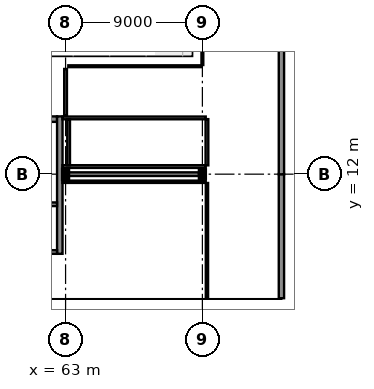
"""IFC4 building model, lengths in metres.
Left out: names, types, materials, properties, quantities, classifications, styles, units other than length and angle.
Written with IfcOpenShell. Run it as: python <this file> out.ifc"""

import sys

from ifc_helpers import new_model, si_unit, direction, frame, frame_2d, origin, origin_2d, place, context, subcontext, project, spatial, rectangle, i_section, extrude, element, fill, save


model = new_model("IFC4")
c1 = context("Model", 3, precision=1e-05, world=origin(), true_north=direction((0.0, 1.0)))
c2 = subcontext(c1, "Body", "Model", "MODEL_VIEW")
j1 = project(units=[si_unit("LENGTHUNIT", "METRE"), si_unit("PLANEANGLEUNIT", "RADIAN")], contexts=[c1])
p1 = place(None, origin())
s1 = spatial("IfcSite", under=j1, at=p1, CompositionType="ELEMENT")
p2 = place(p1, origin())
s2 = spatial("IfcBuilding", under=s1, at=p2, CompositionType="ELEMENT")
p3 = place(p2, origin())
s3 = spatial("IfcBuildingStorey", under=s2, at=p3, CompositionType="ELEMENT", Elevation=0.0)
p4 = place(p3, frame((63.0, 12.0, 0.0), z_axis=(0.0, 0.0, 1.0), x_axis=(1.0, 0.0, 0.0)))
e1 = element("IfcColumn", 1, at=p4, inside=s3, PredefinedType="COLUMN", context=c2, shape_type="SweptSolid", body=[
    extrude(i_section(OverallWidth=0.3, OverallDepth=0.55, WebThickness=0.015, FlangeThickness=0.029, at=origin_2d()), origin(), (0.0, 0.0, 1.0), 5.4),
])
p5 = place(p3, frame((72.0, 12.0, 0.0), z_axis=(0.0, 0.0, 1.0), x_axis=(0.0, 1.0, 0.0)))
e2 = element("IfcColumn", 2, at=p5, inside=s3, PredefinedType="COLUMN", context=c2, shape_type="SweptSolid", body=[
    extrude(i_section(OverallWidth=0.3, OverallDepth=0.45, WebThickness=0.014, FlangeThickness=0.026, at=origin_2d()), origin(), (0.0, 0.0, 1.0), 5.4),
])
p6 = place(p3, frame((77.2, 3.84, 0.0), z_axis=(0.0, 0.0, 1.0), x_axis=(0.0, 1.0, 0.0)))
e3 = element("IfcWall", 3, at=p6, inside=s3, PredefinedType="SOLIDWALL", context=c2, shape_type="SweptSolid", body=[
    extrude(rectangle(XDim=8.17, YDim=0.35, at=frame_2d((4.085, 0.0))), origin(), (0.0, 0.0, 1.0), 5.08),
])
p7 = place(p6, frame((1.701, 0.0, 0.85)))
e4 = element("IfcOpeningElement", 4, at=p7, cuts=e3, PredefinedType="OPENING", context=c2, shape_type="SweptSolid", body=[
    extrude(rectangle(XDim=1.5, YDim=1.5, at=frame_2d((0.75, 0.75))), frame((0.0, 0.19, 0.0), z_axis=(0.0, -1.0, 0.0), x_axis=(1.0, 0.0, 0.0)), (0.0, 0.0, 1.0), 0.38),
])
p8 = place(p6, frame((4.969, 0.0, 0.85)))
e5 = element("IfcOpeningElement", 5, at=p8, cuts=e3, PredefinedType="OPENING", context=c2, shape_type="SweptSolid", body=[
    extrude(rectangle(XDim=1.5, YDim=1.5, at=frame_2d((0.75, 0.75))), frame((0.0, 0.19, 0.0), z_axis=(0.0, -1.0, 0.0), x_axis=(1.0, 0.0, 0.0)), (0.0, 0.0, 1.0), 0.38),
])
p9 = place(p3, frame((77.2, 11.99, 0.0), z_axis=(0.0, 0.0, 1.0), x_axis=(0.0, 1.0, 0.0)))
e6 = element("IfcWall", 6, at=p9, inside=s3, PredefinedType="SOLIDWALL", context=c2, shape_type="SweptSolid", body=[
    extrude(rectangle(XDim=12.05, YDim=0.35, at=frame_2d((6.025, 0.0))), origin(), (0.0, 0.0, 1.0), 5.08),
])
p10 = place(p9, frame((2.07, 0.0, 0.85)))
e7 = element("IfcOpeningElement", 7, at=p10, cuts=e6, PredefinedType="OPENING", context=c2, shape_type="SweptSolid", body=[
    extrude(rectangle(XDim=1.4, YDim=1.4, at=frame_2d((0.7, 0.7))), frame((0.0, 0.19, 0.0), z_axis=(0.0, -1.0, 0.0), x_axis=(1.0, 0.0, 0.0)), (0.0, 0.0, 1.0), 0.38),
])
p11 = place(p9, frame((7.735, 0.0, 0.85)))
e8 = element("IfcOpeningElement", 8, at=p11, cuts=e6, PredefinedType="OPENING", context=c2, shape_type="SweptSolid", body=[
    extrude(rectangle(XDim=1.4, YDim=1.4, at=frame_2d((0.7, 0.7))), frame((0.0, 0.19, 0.0), z_axis=(0.0, -1.0, 0.0), x_axis=(1.0, 0.0, 0.0)), (0.0, 0.0, 1.0), 0.38),
])
p12 = place(p3, frame((58.54, 15.62, 0.0), z_axis=(0.0, 0.0, 1.0), x_axis=(1.0, 0.0, 0.0)))
e9 = element("IfcWall", 9, at=p12, inside=s3, PredefinedType="SHEAR", context=c2, shape_type="SweptSolid", body=[
    extrude(rectangle(XDim=3.9, YDim=0.36, at=frame_2d((1.95, 0.0))), origin(), (0.0, 0.0, 1.0), 5.06),
])
p13 = place(p12, frame((1.15, 0.0, 0.0)))
e10 = element("IfcOpeningElement", 10, at=p13, cuts=e9, PredefinedType="OPENING", context=c2, shape_type="SweptSolid", body=[
    extrude(rectangle(XDim=1.6, YDim=2.25, at=frame_2d((0.8, 1.125))), frame((0.0, 0.195, 0.0), z_axis=(0.0, -1.0, 0.0), x_axis=(1.0, 0.0, 0.0)), (0.0, 0.0, 1.0), 0.39),
])
p14 = place(p3, frame((62.62, 6.76, 0.0), z_axis=(0.0, 0.0, 1.0), x_axis=(0.0, 1.0, 0.0)))
e11 = element("IfcWall", 11, at=p14, inside=s3, PredefinedType="SHEAR", context=c2, shape_type="SweptSolid", body=[
    extrude(rectangle(XDim=9.04, YDim=0.36, at=frame_2d((4.52, 0.0))), origin(), (0.0, 0.0, 1.0), 5.06),
])
p15 = place(p3, frame((58.54, 10.02, 0.0), z_axis=(0.0, 0.0, 1.0), x_axis=(1.0, 0.0, 0.0)))
e12 = element("IfcWall", 12, at=p15, inside=s3, PredefinedType="SHEAR", context=c2, shape_type="SweptSolid", body=[
    extrude(rectangle(XDim=3.9, YDim=0.24, at=frame_2d((1.95, 0.0))), origin(), (0.0, 0.0, 1.0), 5.21),
])
p16 = place(p15, frame((0.235, 0.0, 0.0)))
e13 = element("IfcOpeningElement", 13, at=p16, cuts=e12, PredefinedType="OPENING", context=c2, shape_type="SweptSolid", body=[
    extrude(rectangle(XDim=1.6, YDim=2.3, at=frame_2d((0.8, 1.15))), frame((0.0, 0.135, 0.0), z_axis=(0.0, -1.0, 0.0), x_axis=(1.0, 0.0, 0.0)), (0.0, 0.0, 1.0), 0.27),
])
p17 = place(p15, frame((2.185, 0.0, 0.0)))
e14 = element("IfcOpeningElement", 14, at=p17, cuts=e12, PredefinedType="OPENING", context=c2, shape_type="SweptSolid", body=[
    extrude(rectangle(XDim=1.6, YDim=2.3, at=frame_2d((0.8, 1.15))), frame((0.0, 0.135, 0.0), z_axis=(0.0, -1.0, 0.0), x_axis=(1.0, 0.0, 0.0)), (0.0, 0.0, 1.0), 0.27),
])
p18 = place(p3, frame((58.54, 6.88, 0.0), z_axis=(0.0, 0.0, 1.0), x_axis=(1.0, 0.0, 0.0)))
e15 = element("IfcWall", 15, at=p18, inside=s3, PredefinedType="SHEAR", context=c2, shape_type="SweptSolid", body=[
    extrude(rectangle(XDim=3.9, YDim=0.24, at=frame_2d((1.95, 0.0))), origin(), (0.0, 0.0, 1.0), 5.21),
])
p19 = place(p3, frame((63.008, 12.0, 0.0), z_axis=(0.0, 0.0, 1.0), x_axis=(1.0, 0.0, 0.0)))
e16 = element("IfcWall", 16, at=p19, inside=s3, PredefinedType="SHEAR", context=c2, shape_type="SweptSolid", body=[
    extrude(rectangle(XDim=8.769, YDim=0.24, at=frame_2d((4.385, 0.0))), origin(), (0.0, 0.0, 1.0), 4.535),
])
p20 = place(p3, frame((63.0, 18.92, 0.0), z_axis=(0.0, 0.0, 1.0), x_axis=(0.0, -1.0, 0.0)))
e17 = element("IfcWall", 17, at=p20, inside=s3, PredefinedType="PARTITIONING", context=c2, shape_type="SweptSolid", body=[
    extrude(rectangle(XDim=3.04, YDim=0.18, at=frame_2d((1.52, 0.0))), origin(), (0.0, 0.0, 1.0), 4.635),
])
p21 = place(p20, frame((0.795, 0.0, 0.0)))
e18 = element("IfcOpeningElement", 18, at=p21, cuts=e17, PredefinedType="OPENING", context=c2, shape_type="SweptSolid", body=[
    extrude(rectangle(XDim=1.45, YDim=2.2, at=frame_2d((0.725, 1.1))), frame((0.0, 0.105, 0.0), z_axis=(0.0, -1.0, 0.0), x_axis=(1.0, 0.0, 0.0)), (0.0, 0.0, 1.0), 0.21),
])
p22 = place(p3, frame((62.795, 15.7, 0.0), z_axis=(0.0, 0.0, 1.0), x_axis=(1.0, 0.0, 0.0)))
e19 = element("IfcWall", 19, at=p22, inside=s3, PredefinedType="PARTITIONING", context=c2, shape_type="SweptSolid", body=[
    extrude(rectangle(XDim=9.425, YDim=0.18, at=frame_2d((4.712, 0.0))), origin(), (0.0, 0.0, 1.0), 5.04),
])
p23 = place(p22, frame((3.987, 0.0, 0.0)))
e20 = element("IfcOpeningElement", 20, at=p23, cuts=e19, PredefinedType="OPENING", context=c2, shape_type="SweptSolid", body=[
    extrude(rectangle(XDim=1.45, YDim=2.3, at=frame_2d((0.725, 1.15))), frame((0.0, 0.105, 0.0), z_axis=(0.0, -1.0, 0.0), x_axis=(1.0, 0.0, 0.0)), (0.0, 0.0, 1.0), 0.21),
])
p24 = place(p22, frame((7.375, 0.0, 1.05)))
e21 = element("IfcOpeningElement", 21, at=p24, cuts=e19, PredefinedType="OPENING", context=c2, shape_type="SweptSolid", body=[
    extrude(rectangle(XDim=1.2, YDim=1.0, at=frame_2d((0.6, 0.5))), frame((0.0, 0.105, 0.0), z_axis=(0.0, -1.0, 0.0), x_axis=(1.0, 0.0, 0.0)), (0.0, 0.0, 1.0), 0.21),
])
p25 = place(p3, frame((72.3, 15.62, 0.0), z_axis=(0.0, 0.0, 1.0), x_axis=(0.0, -1.0, 0.0)))
e22 = element("IfcWall", 22, at=p25, inside=s3, PredefinedType="PARTITIONING", context=c2, shape_type="SweptSolid", body=[
    extrude(rectangle(XDim=3.04, YDim=0.18, at=frame_2d((1.52, 0.0))), origin(), (0.0, 0.0, 1.0), 5.04),
])
p26 = place(p3, frame((72.22, 12.5, 0.0), z_axis=(0.0, 0.0, 1.0), x_axis=(-1.0, 0.0, 0.0)))
e23 = element("IfcWall", 23, at=p26, inside=s3, PredefinedType="PARTITIONING", context=c2, shape_type="SweptSolid", body=[
    extrude(rectangle(XDim=9.425, YDim=0.18, at=frame_2d((4.712, 0.0))), origin(), (0.0, 0.0, 1.0), 5.04),
])
p27 = place(p3, frame((63.2, 12.58, 0.0), z_axis=(0.0, 0.0, 1.0), x_axis=(0.0, 1.0, 0.0)))
e24 = element("IfcWall", 24, at=p27, inside=s3, PredefinedType="PARTITIONING", context=c2, shape_type="SweptSolid", body=[
    extrude(rectangle(XDim=3.04, YDim=0.18, at=frame_2d((1.52, 0.0))), origin(), (0.0, 0.0, 1.0), 4.635),
])
p28 = place(p3, frame((72.3, 11.42, 0.0), z_axis=(0.0, 0.0, 1.0), x_axis=(0.0, -1.0, 0.0)))
e25 = element("IfcWall", 25, at=p28, inside=s3, PredefinedType="PARTITIONING", context=c2, shape_type="SweptSolid", body=[
    extrude(rectangle(XDim=7.545, YDim=0.15, at=frame_2d((3.772, 0.0))), origin(), (0.0, 0.0, 1.0), 5.04),
])
p29 = place(p28, frame((3.248, 0.0, 0.0)))
e26 = element("IfcOpeningElement", 26, at=p29, cuts=e25, PredefinedType="OPENING", context=c2, shape_type="SweptSolid", body=[
    extrude(rectangle(XDim=1.05, YDim=2.25, at=frame_2d((0.525, 1.125))), frame((0.0, 0.09, 0.0), z_axis=(0.0, -1.0, 0.0), x_axis=(1.0, 0.0, 0.0)), (0.0, 0.0, 1.0), 0.18),
])
p30 = place(p3, frame((62.795, 11.5, 0.0), z_axis=(0.0, 0.0, 1.0), x_axis=(1.0, 0.0, 0.0)))
e27 = element("IfcWall", 27, at=p30, inside=s3, PredefinedType="PARTITIONING", context=c2, shape_type="SweptSolid", body=[
    extrude(rectangle(XDim=9.425, YDim=0.15, at=frame_2d((4.712, 0.0))), origin(), (0.0, 0.0, 1.0), 5.04),
])
p31 = place(p3, frame((72.0, 23.52, 0.0), z_axis=(0.0, 0.0, 1.0), x_axis=(0.0, -1.0, 0.0)))
e28 = element("IfcWall", 28, at=p31, inside=s3, PredefinedType="PARTITIONING", context=c2, shape_type="SweptSolid", body=[
    extrude(rectangle(XDim=4.34, YDim=0.12, at=frame_2d((2.17, 0.0))), origin(), (0.0, 0.0, 1.0), 4.585),
])
p32 = place(p3, frame((71.92, 19.1, 0.0), z_axis=(0.0, 0.0, 1.0), x_axis=(-1.0, 0.0, 0.0)))
e29 = element("IfcWall", 29, at=p32, inside=s3, PredefinedType="PARTITIONING", context=c2, shape_type="SweptSolid", body=[
    extrude(rectangle(XDim=8.74, YDim=0.12, at=frame_2d((4.37, 0.0))), origin(), (0.0, 0.0, 1.0), 5.04),
])
p33 = place(p32, frame((3.895, 0.0, 0.0)))
e30 = element("IfcOpeningElement", 30, at=p33, cuts=e29, PredefinedType="OPENING", context=c2, shape_type="SweptSolid", body=[
    extrude(rectangle(XDim=0.95, YDim=2.15, at=frame_2d((0.475, 1.075))), frame((0.0, 0.075, 0.0), z_axis=(0.0, -1.0, 0.0), x_axis=(1.0, 0.0, 0.0)), (0.0, 0.0, 1.0), 0.15),
])
p34 = place(p32, frame((5.79, 0.0, 1.05)))
e31 = element("IfcOpeningElement", 31, at=p34, cuts=e29, PredefinedType="OPENING", context=c2, shape_type="SweptSolid", body=[
    extrude(rectangle(XDim=2.1, YDim=1.2, at=frame_2d((1.05, 0.6))), frame((0.0, 0.075, 0.0), z_axis=(0.0, -1.0, 0.0), x_axis=(1.0, 0.0, 0.0)), (0.0, 0.0, 1.0), 0.15),
])
p35 = place(p7, origin())
e32 = element("IfcWindow", 32, at=p35, inside=s3, PartitioningType="SINGLE_PANEL", PredefinedType="WINDOW", context=c2, shape_type="SweptSolid", body=[
    extrude(rectangle(XDim=1.5, YDim=1.5, at=frame_2d((0.75, 0.75))), frame((0.0, 0.03, 0.0), z_axis=(0.0, -1.0, 0.0), x_axis=(1.0, 0.0, 0.0)), (0.0, 0.0, 1.0), 0.06),
])
fill(e4, e32)
p36 = place(p8, origin())
e33 = element("IfcWindow", 33, at=p36, inside=s3, PartitioningType="SINGLE_PANEL", PredefinedType="WINDOW", context=c2, shape_type="SweptSolid", body=[
    extrude(rectangle(XDim=1.5, YDim=1.5, at=frame_2d((0.75, 0.75))), frame((0.0, 0.03, 0.0), z_axis=(0.0, -1.0, 0.0), x_axis=(1.0, 0.0, 0.0)), (0.0, 0.0, 1.0), 0.06),
])
fill(e5, e33)
p37 = place(p10, origin())
e34 = element("IfcWindow", 34, at=p37, inside=s3, PartitioningType="SINGLE_PANEL", PredefinedType="WINDOW", context=c2, shape_type="SweptSolid", body=[
    extrude(rectangle(XDim=1.4, YDim=1.4, at=frame_2d((0.7, 0.7))), frame((0.0, 0.03, 0.0), z_axis=(0.0, -1.0, 0.0), x_axis=(1.0, 0.0, 0.0)), (0.0, 0.0, 1.0), 0.06),
])
fill(e7, e34)
p38 = place(p11, origin())
e35 = element("IfcWindow", 35, at=p38, inside=s3, PartitioningType="SINGLE_PANEL", PredefinedType="WINDOW", context=c2, shape_type="SweptSolid", body=[
    extrude(rectangle(XDim=1.4, YDim=1.4, at=frame_2d((0.7, 0.7))), frame((0.0, 0.03, 0.0), z_axis=(0.0, -1.0, 0.0), x_axis=(1.0, 0.0, 0.0)), (0.0, 0.0, 1.0), 0.06),
])
fill(e8, e35)
p39 = place(p17, origin())
e36 = element("IfcDoor", 36, at=p39, inside=s3, OperationType="DOUBLE_DOOR_SLIDING", PredefinedType="DOOR", context=c2, shape_type="SweptSolid", body=[
    extrude(rectangle(XDim=1.6, YDim=2.3, at=frame_2d((0.8, 1.15))), frame((0.0, 0.025, 0.0), z_axis=(0.0, -1.0, 0.0), x_axis=(1.0, 0.0, 0.0)), (0.0, 0.0, 1.0), 0.05),
])
fill(e14, e36)
p40 = place(p21, origin())
e37 = element("IfcDoor", 37, at=p40, inside=s3, OperationType="DOUBLE_DOOR_SINGLE_SWING", PredefinedType="DOOR", context=c2, shape_type="SweptSolid", body=[
    extrude(rectangle(XDim=1.45, YDim=2.2, at=frame_2d((0.725, 1.1))), frame((0.0, 0.025, 0.0), z_axis=(0.0, -1.0, 0.0), x_axis=(1.0, 0.0, 0.0)), (0.0, 0.0, 1.0), 0.05),
])
fill(e18, e37)
p41 = place(p23, frame((1.45, 0.0, 0.0), z_axis=(0.0, 0.0, 1.0), x_axis=(-1.0, 0.0, 0.0)))
e38 = element("IfcDoor", 38, at=p41, inside=s3, OperationType="DOUBLE_DOOR_SINGLE_SWING", PredefinedType="DOOR", context=c2, shape_type="SweptSolid", body=[
    extrude(rectangle(XDim=1.45, YDim=2.3, at=frame_2d((0.725, 1.15))), frame((0.0, 0.025, 0.0), z_axis=(0.0, -1.0, 0.0), x_axis=(1.0, 0.0, 0.0)), (0.0, 0.0, 1.0), 0.05),
])
fill(e20, e38)
p42 = place(p24, origin())
e39 = element("IfcWindow", 39, at=p42, inside=s3, PartitioningType="SINGLE_PANEL", PredefinedType="WINDOW", context=c2, shape_type="SweptSolid", body=[
    extrude(rectangle(XDim=1.2, YDim=1.0, at=frame_2d((0.6, 0.5))), frame((0.0, 0.03, 0.0), z_axis=(0.0, -1.0, 0.0), x_axis=(1.0, 0.0, 0.0)), (0.0, 0.0, 1.0), 0.06),
])
fill(e21, e39)
p43 = place(p29, origin())
e40 = element("IfcDoor", 40, at=p43, inside=s3, OperationType="SINGLE_SWING_RIGHT", PredefinedType="DOOR", context=c2, shape_type="SweptSolid", body=[
    extrude(rectangle(XDim=1.05, YDim=2.25, at=frame_2d((0.525, 1.125))), frame((0.0, 0.025, 0.0), z_axis=(0.0, -1.0, 0.0), x_axis=(1.0, 0.0, 0.0)), (0.0, 0.0, 1.0), 0.05),
])
fill(e26, e40)
p44 = place(p33, frame((0.95, 0.0, 0.0), z_axis=(0.0, 0.0, 1.0), x_axis=(-1.0, 0.0, 0.0)))
e41 = element("IfcDoor", 41, at=p44, inside=s3, OperationType="SINGLE_SWING_LEFT", PredefinedType="DOOR", context=c2, shape_type="SweptSolid", body=[
    extrude(rectangle(XDim=0.95, YDim=2.15, at=frame_2d((0.475, 1.075))), frame((0.0, 0.025, 0.0), z_axis=(0.0, -1.0, 0.0), x_axis=(1.0, 0.0, 0.0)), (0.0, 0.0, 1.0), 0.05),
])
fill(e30, e41)
p45 = place(p34, origin())
e42 = element("IfcWindow", 42, at=p45, inside=s3, PartitioningType="SINGLE_PANEL", PredefinedType="WINDOW", context=c2, shape_type="SweptSolid", body=[
    extrude(rectangle(XDim=2.1, YDim=1.2, at=frame_2d((1.05, 0.6))), frame((0.0, 0.03, 0.0), z_axis=(0.0, -1.0, 0.0), x_axis=(1.0, 0.0, 0.0)), (0.0, 0.0, 1.0), 0.06),
])
fill(e31, e42)
save(model, sys.argv[1])
